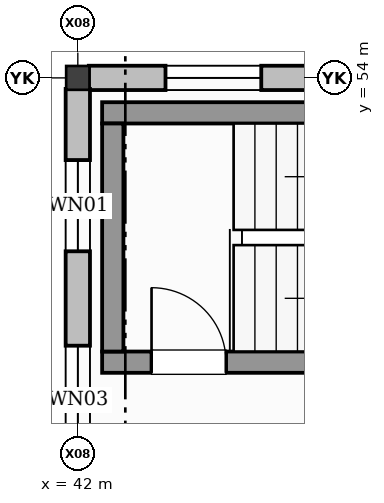
"""IFC4 building model, lengths in metres.
Left out: names, types, materials, properties, quantities, classifications, styles, units other than length and angle.
Written with IfcOpenShell. Run it as: python <this file> out.ifc"""

import sys

from ifc_helpers import new_model, si_unit, direction, frame, frame_2d, origin, origin_2d, place, context, subcontext, project, spatial, rectangle, i_section, extrude, element, fill, save


model = new_model("IFC4")
c1 = context("Model", 3, precision=1e-05, world=origin(), true_north=direction((0.0, 1.0)))
c2 = subcontext(c1, "Body", "Model", "MODEL_VIEW")
j1 = project(units=[si_unit("LENGTHUNIT", "METRE"), si_unit("PLANEANGLEUNIT", "RADIAN")], contexts=[c1])
p1 = place(None, origin())
s1 = spatial("IfcSite", under=j1, at=p1, CompositionType="ELEMENT")
p2 = place(p1, origin())
s2 = spatial("IfcBuilding", under=s1, at=p2, CompositionType="ELEMENT")
p3 = place(p2, frame((0.0, 0.0, 6.0)))
s3 = spatial("IfcBuildingStorey", under=s2, at=p3, CompositionType="ELEMENT", Elevation=6.0)
p4 = place(p3, frame((42.0, 54.0, 0.0), z_axis=(0.0, 0.0, 1.0), x_axis=(1.0, 0.0, 0.0)))
e1 = element("IfcColumn", 1, at=p4, inside=s3, PredefinedType="COLUMN", context=c2, shape_type="SweptSolid", body=[
    extrude(i_section(OverallWidth=0.307, OverallDepth=0.314, WebThickness=0.011, FlangeThickness=0.019, at=origin_2d()), origin(), (0.0, 0.0, 1.0), 4.0),
])
p5 = place(p3, frame((47.855, 54.0, 0.0), z_axis=(0.0, 0.0, 1.0), x_axis=(-1.0, 0.0, 0.0)))
e2 = element("IfcWall", 2, at=p5, inside=s3, PredefinedType="STANDARD", context=c2, shape_type="SweptSolid", body=[
    extrude(rectangle(XDim=5.71, YDim=0.32, at=frame_2d((2.855, 0.0))), origin(), (0.0, 0.0, 1.0), 4.0),
])
p6 = place(p5, frame((1.053, 0.0, 0.96)))
e3 = element("IfcOpeningElement", 3, at=p6, cuts=e2, PredefinedType="OPENING", context=c2, shape_type="SweptSolid", body=[
    extrude(rectangle(XDim=1.02, YDim=1.02, at=frame_2d((0.51, 0.51))), frame((0.0, 0.17, 0.0), z_axis=(0.0, -1.0, 0.0), x_axis=(1.0, 0.0, 0.0)), (0.0, 0.0, 1.0), 0.34),
])
p7 = place(p5, frame((3.441, 0.0, 0.86)))
e4 = element("IfcOpeningElement", 4, at=p7, cuts=e2, PredefinedType="OPENING", context=c2, shape_type="SweptSolid", body=[
    extrude(rectangle(XDim=1.26, YDim=1.26, at=frame_2d((0.63, 0.63))), frame((0.0, 0.17, 0.0), z_axis=(0.0, -1.0, 0.0), x_axis=(1.0, 0.0, 0.0)), (0.0, 0.0, 1.0), 0.34),
])
p8 = place(p3, frame((42.0, 53.855, 0.0), z_axis=(0.0, 0.0, 1.0), x_axis=(0.0, -1.0, 0.0)))
e5 = element("IfcWall", 5, at=p8, inside=s3, PredefinedType="STANDARD", context=c2, shape_type="SweptSolid", body=[
    extrude(rectangle(XDim=5.71, YDim=0.32, at=frame_2d((2.855, 0.0))), origin(), (0.0, 0.0, 1.0), 3.339),
])
p9 = place(p8, frame((0.936, 0.0, 0.86)))
e6 = element("IfcOpeningElement", 6, at=p9, cuts=e5, PredefinedType="OPENING", context=c2, shape_type="SweptSolid", body=[
    extrude(rectangle(XDim=1.2, YDim=1.2, at=frame_2d((0.6, 0.6))), frame((0.0, 0.17, 0.0), z_axis=(0.0, -1.0, 0.0), x_axis=(1.0, 0.0, 0.0)), (0.0, 0.0, 1.0), 0.34),
])
p10 = place(p8, frame((3.378, 0.0, 1.42)))
e7 = element("IfcOpeningElement", 7, at=p10, cuts=e5, PredefinedType="OPENING", context=c2, shape_type="SweptSolid", body=[
    extrude(rectangle(XDim=1.44, YDim=1.44, at=frame_2d((0.72, 0.72))), frame((0.0, 0.17, 0.0), z_axis=(0.0, -1.0, 0.0), x_axis=(1.0, 0.0, 0.0)), (0.0, 0.0, 1.0), 0.34),
])
p11 = place(p3, frame((42.32, 50.26, 0.0), z_axis=(0.0, 0.0, 1.0), x_axis=(1.0, 0.0, 0.0)))
e8 = element("IfcWall", 8, at=p11, inside=s3, PredefinedType="SHEAR", context=c2, shape_type="SweptSolid", body=[
    extrude(rectangle(XDim=8.16, YDim=0.28, at=frame_2d((4.08, 0.0))), origin(), (0.0, 0.0, 1.0), 3.75),
])
p12 = place(p11, frame((0.65, 0.0, 0.0)))
e9 = element("IfcOpeningElement", 9, at=p12, cuts=e8, PredefinedType="OPENING", context=c2, shape_type="SweptSolid", body=[
    extrude(rectangle(XDim=0.98, YDim=2.15, at=frame_2d((0.49, 1.075))), frame((0.0, 0.15, 0.0), z_axis=(0.0, -1.0, 0.0), x_axis=(1.0, 0.0, 0.0)), (0.0, 0.0, 1.0), 0.3),
])
p13 = place(p3, frame((50.48, 53.54, 0.0), z_axis=(0.0, 0.0, 1.0), x_axis=(-1.0, 0.0, 0.0)))
e10 = element("IfcWall", 10, at=p13, inside=s3, PredefinedType="SHEAR", context=c2, shape_type="SweptSolid", body=[
    extrude(rectangle(XDim=8.16, YDim=0.28, at=frame_2d((4.08, 0.0))), origin(), (0.0, 0.0, 1.0), 3.75),
])
p14 = place(p3, frame((42.46, 53.4, 0.0), z_axis=(0.0, 0.0, 1.0), x_axis=(0.0, -1.0, 0.0)))
e11 = element("IfcWall", 11, at=p14, inside=s3, PredefinedType="SHEAR", context=c2, shape_type="SweptSolid", body=[
    extrude(rectangle(XDim=3.0, YDim=0.28, at=frame_2d((1.5, 0.0))), origin(), (0.0, 0.0, 1.0), 3.75),
])
p15 = place(p7, origin())
e12 = element("IfcWindow", 12, at=p15, inside=s3, PartitioningType="SINGLE_PANEL", PredefinedType="WINDOW", context=c2, shape_type="SweptSolid", body=[
    extrude(rectangle(XDim=1.26, YDim=1.26, at=frame_2d((0.63, 0.63))), frame((0.0, 0.03, 0.0), z_axis=(0.0, -1.0, 0.0), x_axis=(1.0, 0.0, 0.0)), (0.0, 0.0, 1.0), 0.06),
])
fill(e4, e12)
p16 = place(p9, origin())
e13 = element("IfcWindow", 13, at=p16, inside=s3, PartitioningType="SINGLE_PANEL", PredefinedType="WINDOW", context=c2, shape_type="SweptSolid", body=[
    extrude(rectangle(XDim=1.2, YDim=1.2, at=frame_2d((0.6, 0.6))), frame((0.0, 0.03, 0.0), z_axis=(0.0, -1.0, 0.0), x_axis=(1.0, 0.0, 0.0)), (0.0, 0.0, 1.0), 0.06),
])
fill(e6, e13)
p17 = place(p10, origin())
e14 = element("IfcWindow", 14, at=p17, inside=s3, PartitioningType="SINGLE_PANEL", PredefinedType="WINDOW", context=c2, shape_type="SweptSolid", body=[
    extrude(rectangle(XDim=1.44, YDim=1.44, at=frame_2d((0.72, 0.72))), frame((0.0, 0.03, 0.0), z_axis=(0.0, -1.0, 0.0), x_axis=(1.0, 0.0, 0.0)), (0.0, 0.0, 1.0), 0.06),
])
fill(e7, e14)
p18 = place(p12, origin())
e15 = element("IfcDoor", 15, at=p18, inside=s3, OperationType="SINGLE_SWING_LEFT", PredefinedType="DOOR", context=c2, shape_type="SweptSolid", body=[
    extrude(rectangle(XDim=0.98, YDim=2.15, at=frame_2d((0.49, 1.075))), frame((0.0, 0.025, 0.0), z_axis=(0.0, -1.0, 0.0), x_axis=(1.0, 0.0, 0.0)), (0.0, 0.0, 1.0), 0.05),
])
fill(e9, e15)
save(model, sys.argv[1])
